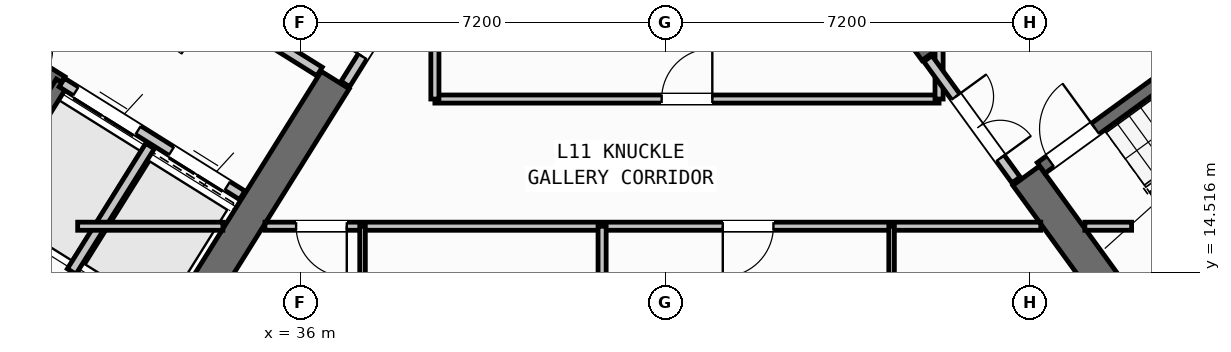
"""IFC4 building model, lengths in metres.
Left out: names, types, materials, properties, quantities, classifications, styles, units other than length and angle.
Written with IfcOpenShell. Run it as: python <this file> out.ifc"""

import sys

from ifc_helpers import new_model, si_unit, direction, frame, frame_2d, origin, place, context, subcontext, project, spatial, rectangle, extrude, source, transform, mapped, element, fill, save


model = new_model("IFC4")
c1 = context("Model", 3, precision=1e-05, world=origin(), true_north=direction((0.0, 1.0)))
c2 = subcontext(c1, "Body", "Model", "MODEL_VIEW")
j1 = project(units=[si_unit("LENGTHUNIT", "METRE"), si_unit("PLANEANGLEUNIT", "RADIAN")], contexts=[c1])
p1 = place(None, origin())
s1 = spatial("IfcSite", under=j1, at=p1, CompositionType="ELEMENT")
p2 = place(p1, origin())
s2 = spatial("IfcBuilding", under=s1, at=p2, CompositionType="ELEMENT")
p3 = place(p2, frame((0.0, 0.0, 45.6)))
s3 = spatial("IfcBuildingStorey", under=s2, at=p3, CompositionType="ELEMENT", Elevation=45.6)
p4 = place(p3, frame((33.409, 12.45, 0.0), z_axis=(0.0, 0.0, 1.0), x_axis=(-0.848051132073, 0.529914405721, 0.0)))
e1 = element("IfcWall", 1, at=p4, inside=s3, PredefinedType="SHEAR", context=c2, shape_type="SweptSolid", body=[
    extrude(rectangle(XDim=13.24, YDim=0.65, at=frame_2d((6.62, 0.0))), origin(), (0.0, 0.0, 1.0), 3.35),
])
p5 = place(p3, frame((36.683, 18.304, 0.0), z_axis=(0.0, 0.0, 1.0), x_axis=(-0.529899109053, -0.848060690178, 0.0)))
e2 = element("IfcWall", 2, at=p5, inside=s3, PredefinedType="SHEAR", context=c2, shape_type="SweptSolid", body=[
    extrude(rectangle(XDim=6.375, YDim=0.65, at=frame_2d((3.188, 0.0))), origin(), (0.0, 0.0, 1.0), 3.35),
])
p6 = place(p3, frame((52.318, 13.11, 0.0), z_axis=(0.0, 0.0, 1.0), x_axis=(0.809019445368, 0.587781878776, 0.0)))
e3 = element("IfcWall", 3, at=p6, inside=s3, PredefinedType="SHEAR", context=c2, shape_type="SweptSolid", body=[
    extrude(rectangle(XDim=12.44, YDim=0.65, at=frame_2d((6.22, 0.0))), origin(), (0.0, 0.0, 1.0), 3.35),
])
p7 = place(p3, frame((52.39, 13.564, 0.0), z_axis=(0.0, 0.0, 1.0), x_axis=(-0.58779688989, 0.809008539037, 0.0)))
e4 = element("IfcWall", 4, at=p7, inside=s3, PredefinedType="SHEAR", context=c2, shape_type="SweptSolid", body=[
    extrude(rectangle(XDim=3.525, YDim=0.65, at=frame_2d((1.763, 0.0))), origin(), (0.0, 0.0, 1.0), 3.35),
])
p8 = place(p3, frame((48.526, 18.884, 0.0), z_axis=(0.0, 0.0, 1.0), x_axis=(-0.58777996584, 0.809020835181, 0.0)))
e5 = element("IfcWall", 5, at=p8, inside=s3, PredefinedType="SHEAR", context=c2, shape_type="SweptSolid", body=[
    extrude(rectangle(XDim=6.375, YDim=0.65, at=frame_2d((3.188, 0.0))), origin(), (0.0, 0.0, 1.0), 3.35),
])
p9 = place(p3, frame((31.28, 18.261, 0.0), z_axis=(0.0, 0.0, 1.0), x_axis=(-0.848051618787, 0.529913626805, 0.0)))
e6 = element("IfcWall", 6, at=p9, inside=s3, PredefinedType="SHEAR", context=c2, shape_type="SweptSolid", body=[
    extrude(rectangle(XDim=7.46, YDim=0.26, at=frame_2d((3.73, 0.0))), origin(), (0.0, 0.0, 1.0), 3.35),
])
p10 = place(p9, frame((0.36, 0.0, 0.0)))
e7 = element("IfcOpeningElement", 7, at=p10, cuts=e6, PredefinedType="OPENING", context=c2, shape_type="SweptSolid", body=[
    extrude(rectangle(XDim=0.86, YDim=2.05, at=frame_2d((0.43, 1.025))), frame((0.0, 0.14, 0.0), z_axis=(0.0, -1.0, 0.0), x_axis=(1.0, 0.0, 0.0)), (0.0, 0.0, 1.0), 0.28),
])
p11 = place(p3, frame((31.288, 18.256, 0.0), z_axis=(0.0, 0.0, 1.0), x_axis=(-0.529943379326, -0.848033026897, 0.0)))
e8 = element("IfcWall", 8, at=p11, inside=s3, PredefinedType="SHEAR", context=c2, shape_type="SweptSolid", body=[
    extrude(rectangle(XDim=3.16, YDim=0.26, at=frame_2d((1.58, 0.0))), origin(), (0.0, 0.0, 1.0), 3.35),
])
p12 = place(p3, frame((34.848, 16.031, 0.0), z_axis=(0.0, 0.0, 1.0), x_axis=(-0.848044042236, 0.529925751807, 0.0)))
e9 = element("IfcWall", 9, at=p12, inside=s3, PredefinedType="STANDARD", context=c2, shape_type="SweptSolid", body=[
    extrude(rectangle(XDim=4.198, YDim=0.2, at=frame_2d((2.099, 0.0))), origin(), (0.0, 0.0, 1.0), 3.34),
])
p13 = place(p12, frame((0.348, 0.0, 0.0)))
e10 = element("IfcOpeningElement", 10, at=p13, cuts=e9, PredefinedType="OPENING", context=c2, shape_type="SweptSolid", body=[
    extrude(rectangle(XDim=1.3, YDim=2.2, at=frame_2d((0.65, 1.1))), frame((0.0, 0.11, 0.0), z_axis=(0.0, -1.0, 0.0), x_axis=(1.0, 0.0, 0.0)), (0.0, 0.0, 1.0), 0.22),
])
p14 = place(p12, frame((2.423, 0.0, 0.0)))
e11 = element("IfcOpeningElement", 11, at=p14, cuts=e9, PredefinedType="OPENING", context=c2, shape_type="SweptSolid", body=[
    extrude(rectangle(XDim=1.45, YDim=2.25, at=frame_2d((0.725, 1.125))), frame((0.0, 0.11, 0.0), z_axis=(0.0, -1.0, 0.0), x_axis=(1.0, 0.0, 0.0)), (0.0, 0.0, 1.0), 0.22),
])
p15 = place(p3, frame((36.374, 18.474, 0.0), z_axis=(0.0, 0.0, 1.0), x_axis=(-0.848051071577, 0.529914502535, 0.0)))
e12 = element("IfcWall", 12, at=p15, inside=s3, PredefinedType="STANDARD", context=c2, shape_type="SweptSolid", body=[
    extrude(rectangle(XDim=5.718, YDim=0.2, at=frame_2d((2.859, 0.0))), origin(), (0.0, 0.0, 1.0), 3.34),
])
p16 = place(p15, frame((2.498, 0.0, 0.0)))
e13 = element("IfcOpeningElement", 13, at=p16, cuts=e12, PredefinedType="OPENING", context=c2, shape_type="SweptSolid", body=[
    extrude(rectangle(XDim=1.15, YDim=2.1, at=frame_2d((0.575, 1.05))), frame((0.0, 0.11, 0.0), z_axis=(0.0, -1.0, 0.0), x_axis=(1.0, 0.0, 0.0)), (0.0, 0.0, 1.0), 0.22),
])
p17 = place(p3, frame((33.029, 17.003, 0.0), z_axis=(0.0, 0.0, 1.0), x_axis=(-0.529916267533, -0.848049968695, 0.0)))
e14 = element("IfcWall", 14, at=p17, inside=s3, PredefinedType="STANDARD", context=c2, shape_type="SweptSolid", body=[
    extrude(rectangle(XDim=2.92, YDim=0.2, at=frame_2d((1.46, 0.0))), origin(), (0.0, 0.0, 1.0), 3.34),
])
p18 = place(p3, frame((52.472, 14.013, 0.0), z_axis=(0.0, 0.0, 1.0), x_axis=(0.809028366311, 0.587769599847, 0.0)))
e15 = element("IfcWall", 15, at=p18, inside=s3, PredefinedType="SHEAR", context=c2, shape_type="SweptSolid", body=[
    extrude(rectangle(XDim=7.33, YDim=0.26, at=frame_2d((3.665, 0.0))), origin(), (0.0, 0.0, 1.0), 3.35),
])
p19 = place(p3, frame((50.615, 16.57, 0.0), z_axis=(0.0, 0.0, 1.0), x_axis=(0.809028366311, 0.587769599847, 0.0)))
e16 = element("IfcWall", 16, at=p19, inside=s3, PredefinedType="SHEAR", context=c2, shape_type="SweptSolid", body=[
    extrude(rectangle(XDim=7.33, YDim=0.26, at=frame_2d((3.665, 0.0))), origin(), (0.0, 0.0, 1.0), 3.35),
])
p20 = place(p19, frame((0.22, 0.0, 0.0)))
e17 = element("IfcOpeningElement", 17, at=p20, cuts=e16, PredefinedType="OPENING", context=c2, shape_type="SweptSolid", body=[
    extrude(rectangle(XDim=1.1, YDim=2.1, at=frame_2d((0.55, 1.05))), frame((0.0, 0.14, 0.0), z_axis=(0.0, -1.0, 0.0), x_axis=(1.0, 0.0, 0.0)), (0.0, 0.0, 1.0), 0.28),
])
p21 = place(p3, frame((32.164, 10.374, 0.0), z_axis=(0.0, 0.0, 1.0), x_axis=(-0.848044107957, 0.529925646633, 0.0)))
e18 = element("IfcWall", 18, at=p21, inside=s3, PredefinedType="PARTITIONING", context=c2, shape_type="SweptSolid", body=[
    extrude(rectangle(XDim=15.57, YDim=0.16, at=frame_2d((7.785, 0.0))), origin(), (0.0, 0.0, 1.0), 3.34),
])
p22 = place(p21, frame((10.83, 0.0, 0.0)))
e19 = element("IfcOpeningElement", 19, at=p22, cuts=e18, PredefinedType="OPENING", context=c2, shape_type="SweptSolid", body=[
    extrude(rectangle(XDim=1.0, YDim=2.1, at=frame_2d((0.5, 1.05))), frame((0.0, 0.09, 0.0), z_axis=(0.0, -1.0, 0.0), x_axis=(1.0, 0.0, 0.0)), (0.0, 0.0, 1.0), 0.18),
])
p23 = place(p3, frame((38.451, 20.737, 0.0), z_axis=(0.0, 0.0, 1.0), x_axis=(-0.529924799939, -0.848044637038, 0.0)))
e20 = element("IfcWall", 20, at=p23, inside=s3, PredefinedType="STANDARD", context=c2, shape_type="SweptSolid", body=[
    extrude(rectangle(XDim=2.96, YDim=0.2, at=frame_2d((1.48, 0.0))), origin(), (0.0, 0.0, 1.0), 3.34),
])
p24 = place(p23, frame((1.46, 0.0, 0.0)))
e21 = element("IfcOpeningElement", 21, at=p24, cuts=e20, PredefinedType="OPENING", context=c2, shape_type="SweptSolid", body=[
    extrude(rectangle(XDim=0.86, YDim=2.05, at=frame_2d((0.43, 1.025))), frame((0.0, 0.11, 0.0), z_axis=(0.0, -1.0, 0.0), x_axis=(1.0, 0.0, 0.0)), (0.0, 0.0, 1.0), 0.22),
])
p25 = place(p3, frame((31.6, 15.42, 0.0), z_axis=(0.0, 0.0, 1.0), x_axis=(1.0, 0.0, 0.0)))
e22 = element("IfcWall", 22, at=p25, inside=s3, PredefinedType="PARTITIONING", context=c2, shape_type="SweptSolid", body=[
    extrude(rectangle(XDim=2.866, YDim=0.16, at=frame_2d((1.433, 0.0))), origin(), (0.0, 0.0, 1.0), 3.34),
])
p26 = place(p3, frame((35.296, 15.42, 0.0), z_axis=(0.0, 0.0, 1.0), x_axis=(1.0, 0.0, 0.0)))
e23 = element("IfcWall", 23, at=p26, inside=s3, PredefinedType="PARTITIONING", context=c2, shape_type="SweptSolid", body=[
    extrude(rectangle(XDim=15.311, YDim=0.16, at=frame_2d((7.655, 0.0))), origin(), (0.0, 0.0, 1.0), 3.34),
])
p27 = place(p26, frame((0.615, 0.0, 0.0)))
e24 = element("IfcOpeningElement", 24, at=p27, cuts=e23, PredefinedType="OPENING", context=c2, shape_type="SweptSolid", body=[
    extrude(rectangle(XDim=1.0, YDim=2.1, at=frame_2d((0.5, 1.05))), frame((0.0, 0.09, 0.0), z_axis=(0.0, -1.0, 0.0), x_axis=(1.0, 0.0, 0.0)), (0.0, 0.0, 1.0), 0.18),
])
p28 = place(p26, frame((9.035, 0.0, 0.0)))
e25 = element("IfcOpeningElement", 25, at=p28, cuts=e23, PredefinedType="OPENING", context=c2, shape_type="SweptSolid", body=[
    extrude(rectangle(XDim=1.0, YDim=2.1, at=frame_2d((0.5, 1.05))), frame((0.0, 0.09, 0.0), z_axis=(0.0, -1.0, 0.0), x_axis=(1.0, 0.0, 0.0)), (0.0, 0.0, 1.0), 0.18),
])
p29 = place(p3, frame((51.477, 15.42, 0.0), z_axis=(0.0, 0.0, 1.0), x_axis=(1.0, 0.0, 0.0)))
e26 = element("IfcWall", 26, at=p29, inside=s3, PredefinedType="PARTITIONING", context=c2, shape_type="SweptSolid", body=[
    extrude(rectangle(XDim=0.923, YDim=0.16, at=frame_2d((0.461, 0.0))), origin(), (0.0, 0.0, 1.0), 3.34),
])
p30 = place(p3, frame((38.65, 17.93, 0.0), z_axis=(0.0, 0.0, 1.0), x_axis=(1.0, 0.0, 0.0)))
e27 = element("IfcWall", 27, at=p30, inside=s3, PredefinedType="PARTITIONING", context=c2, shape_type="SweptSolid", body=[
    extrude(rectangle(XDim=9.95, YDim=0.16, at=frame_2d((4.975, 0.0))), origin(), (0.0, 0.0, 1.0), 3.34),
])
p31 = place(p30, frame((4.475, 0.0, 0.0)))
e28 = element("IfcOpeningElement", 28, at=p31, cuts=e27, PredefinedType="OPENING", context=c2, shape_type="SweptSolid", body=[
    extrude(rectangle(XDim=1.0, YDim=2.1, at=frame_2d((0.5, 1.05))), frame((0.0, 0.09, 0.0), z_axis=(0.0, -1.0, 0.0), x_axis=(1.0, 0.0, 0.0)), (0.0, 0.0, 1.0), 0.18),
])
p32 = place(p3, frame((38.65, 17.93, 0.0), z_axis=(0.0, 0.0, 1.0), x_axis=(0.0, 1.0, 0.0)))
e29 = element("IfcWall", 29, at=p32, inside=s3, PredefinedType="PARTITIONING", context=c2, shape_type="SweptSolid", body=[
    extrude(rectangle(XDim=2.857, YDim=0.16, at=frame_2d((1.428, 0.0))), origin(), (0.0, 0.0, 1.0), 3.34),
])
p33 = place(p3, frame((48.6, 17.93, 0.0), z_axis=(0.0, 0.0, 1.0), x_axis=(0.0, 1.0, 0.0)))
e30 = element("IfcWall", 30, at=p33, inside=s3, PredefinedType="PARTITIONING", context=c2, shape_type="SweptSolid", body=[
    extrude(rectangle(XDim=0.993, YDim=0.16, at=frame_2d((0.496, 0.0))), origin(), (0.0, 0.0, 1.0), 3.34),
])
p34 = place(p3, frame((50.119, 16.333, 0.0), z_axis=(0.0, 0.0, 1.0), x_axis=(-0.587749856981, 0.809042709391, 0.0)))
e31 = element("IfcWall", 31, at=p34, inside=s3, PredefinedType="STANDARD", context=c2, shape_type="SweptSolid", body=[
    extrude(rectangle(XDim=2.96, YDim=0.2, at=frame_2d((1.48, 0.0))), origin(), (0.0, 0.0, 1.0), 3.34),
])
p35 = place(p34, frame((0.53, 0.0, 0.0)))
e32 = element("IfcOpeningElement", 32, at=p35, cuts=e31, PredefinedType="OPENING", context=c2, shape_type="SweptSolid", body=[
    extrude(rectangle(XDim=1.5, YDim=2.15, at=frame_2d((0.75, 1.075))), frame((0.0, 0.11, 0.0), z_axis=(0.0, -1.0, 0.0), x_axis=(1.0, 0.0, 0.0)), (0.0, 0.0, 1.0), 0.22),
])
p36 = place(p3, frame((41.95, 1.96, 0.0), z_axis=(0.0, 0.0, 1.0), x_axis=(0.0, 1.0, 0.0)))
e33 = element("IfcWall", 33, at=p36, inside=s3, PredefinedType="PARTITIONING", context=c2, shape_type="SweptSolid", body=[
    extrude(rectangle(XDim=13.46, YDim=0.16, at=frame_2d((6.73, 0.0))), origin(), (0.0, 0.0, 1.0), 3.34),
])
p37 = place(p3, frame((37.222, 1.96, 0.0), z_axis=(0.0, 0.0, 1.0), x_axis=(0.0, 1.0, 0.0)))
e34 = element("IfcWall", 34, at=p37, inside=s3, PredefinedType="PARTITIONING", context=c2, shape_type="SweptSolid", body=[
    extrude(rectangle(XDim=13.46, YDim=0.11, at=frame_2d((6.73, 0.0))), origin(), (0.0, 0.0, 1.0), 3.34),
])
p38 = place(p37, frame((5.2, 0.0, 0.0)))
e35 = element("IfcOpeningElement", 35, at=p38, cuts=e34, PredefinedType="OPENING", context=c2, shape_type="SweptSolid", body=[
    extrude(rectangle(XDim=0.92, YDim=2.08, at=frame_2d((0.46, 1.04))), frame((0.0, 0.065, 0.0), z_axis=(0.0, -1.0, 0.0), x_axis=(1.0, 0.0, 0.0)), (0.0, 0.0, 1.0), 0.13),
])
p39 = place(p37, frame((10.89, 0.0, 0.0)))
e36 = element("IfcOpeningElement", 36, at=p39, cuts=e34, PredefinedType="OPENING", context=c2, shape_type="SweptSolid", body=[
    extrude(rectangle(XDim=0.88, YDim=2.08, at=frame_2d((0.44, 1.04))), frame((0.0, 0.065, 0.0), z_axis=(0.0, -1.0, 0.0), x_axis=(1.0, 0.0, 0.0)), (0.0, 0.0, 1.0), 0.13),
])
p40 = place(p3, frame((47.663, 1.96, 0.0), z_axis=(0.0, 0.0, 1.0), x_axis=(0.0, 1.0, 0.0)))
e37 = element("IfcWall", 37, at=p40, inside=s3, PredefinedType="PARTITIONING", context=c2, shape_type="SweptSolid", body=[
    extrude(rectangle(XDim=13.46, YDim=0.11, at=frame_2d((6.73, 0.0))), origin(), (0.0, 0.0, 1.0), 3.34),
])
p41 = place(p40, frame((6.3, 0.0, 0.0)))
e38 = element("IfcOpeningElement", 38, at=p41, cuts=e37, PredefinedType="OPENING", context=c2, shape_type="SweptSolid", body=[
    extrude(rectangle(XDim=0.92, YDim=2.08, at=frame_2d((0.46, 1.04))), frame((0.0, 0.065, 0.0), z_axis=(0.0, -1.0, 0.0), x_axis=(1.0, 0.0, 0.0)), (0.0, 0.0, 1.0), 0.13),
])
p42 = place(p40, frame((11.54, 0.0, 0.0)))
e39 = element("IfcOpeningElement", 39, at=p42, cuts=e37, PredefinedType="OPENING", context=c2, shape_type="SweptSolid", body=[
    extrude(rectangle(XDim=0.88, YDim=2.08, at=frame_2d((0.44, 1.04))), frame((0.0, 0.065, 0.0), z_axis=(0.0, -1.0, 0.0), x_axis=(1.0, 0.0, 0.0)), (0.0, 0.0, 1.0), 0.13),
])
m1 = source(origin(), c2, "Body", "SweptSolid", [
    extrude(rectangle(XDim=1.3, YDim=2.2, at=frame_2d((0.65, 1.1))), frame((0.0, 0.025, 0.0), z_axis=(0.0, -1.0, 0.0), x_axis=(1.0, 0.0, 0.0)), (0.0, 0.0, 1.0), 0.05),
])
p43 = place(p13, origin())
e40 = element("IfcDoor", 40, at=p43, inside=s3, OperationType="DOUBLE_DOOR_SLIDING", PredefinedType="DOOR", context=c2, shape_type="MappedRepresentation", body=[
    mapped(m1, transform((0.0, 0.0, 0.0), scale=1.0)),
])
fill(e10, e40)
m2 = source(origin(), c2, "Body", "SweptSolid", [
    extrude(rectangle(XDim=1.45, YDim=2.25, at=frame_2d((0.725, 1.125))), frame((0.0, 0.025, 0.0), z_axis=(0.0, -1.0, 0.0), x_axis=(1.0, 0.0, 0.0)), (0.0, 0.0, 1.0), 0.05),
])
p44 = place(p14, origin())
e41 = element("IfcDoor", 41, at=p44, inside=s3, OperationType="DOUBLE_DOOR_SLIDING", PredefinedType="DOOR", context=c2, shape_type="MappedRepresentation", body=[
    mapped(m2, transform((0.0, 0.0, 0.0), scale=1.0)),
])
fill(e11, e41)
m3 = source(origin(), c2, "Body", "SweptSolid", [
    extrude(rectangle(XDim=1.1, YDim=2.1, at=frame_2d((0.55, 1.05))), frame((0.0, 0.025, 0.0), z_axis=(0.0, -1.0, 0.0), x_axis=(1.0, 0.0, 0.0)), (0.0, 0.0, 1.0), 0.05),
])
p45 = place(p20, origin())
e42 = element("IfcDoor", 42, at=p45, inside=s3, OperationType="SINGLE_SWING_RIGHT", PredefinedType="DOOR", context=c2, shape_type="MappedRepresentation", body=[
    mapped(m3, transform((0.0, 0.0, 0.0), scale=1.0)),
])
fill(e17, e42)
m4 = source(origin(), c2, "Body", "SweptSolid", [
    extrude(rectangle(XDim=1.0, YDim=2.1, at=frame_2d((0.5, 1.05))), frame((0.0, 0.025, 0.0), z_axis=(0.0, -1.0, 0.0), x_axis=(1.0, 0.0, 0.0)), (0.0, 0.0, 1.0), 0.05),
])
p46 = place(p31, origin())
e43 = element("IfcDoor", 43, at=p46, inside=s3, OperationType="SINGLE_SWING_RIGHT", PredefinedType="DOOR", context=c2, shape_type="MappedRepresentation", body=[
    mapped(m4, transform((0.0, 0.0, 0.0), scale=1.0)),
])
fill(e28, e43)
m5 = source(origin(), c2, "Body", "SweptSolid", [
    extrude(rectangle(XDim=0.86, YDim=2.05, at=frame_2d((0.43, 1.025))), frame((0.0, 0.025, 0.0), z_axis=(0.0, -1.0, 0.0), x_axis=(1.0, 0.0, 0.0)), (0.0, 0.0, 1.0), 0.05),
])
p47 = place(p24, frame((0.86, 0.0, 0.0), z_axis=(0.0, 0.0, 1.0), x_axis=(-1.0, 0.0, 0.0)))
e44 = element("IfcDoor", 44, at=p47, inside=s3, OperationType="SINGLE_SWING_LEFT", PredefinedType="DOOR", context=c2, shape_type="MappedRepresentation", body=[
    mapped(m5, transform((0.0, 0.0, 0.0), scale=1.0)),
])
fill(e21, e44)
m6 = source(origin(), c2, "Body", "SweptSolid", [
    extrude(rectangle(XDim=1.5, YDim=2.15, at=frame_2d((0.75, 1.075))), frame((0.0, 0.025, 0.0), z_axis=(0.0, -1.0, 0.0), x_axis=(1.0, 0.0, 0.0)), (0.0, 0.0, 1.0), 0.05),
])
p48 = place(p35, frame((1.5, 0.0, 0.0), z_axis=(0.0, 0.0, 1.0), x_axis=(-1.0, 0.0, 0.0)))
e45 = element("IfcDoor", 45, at=p48, inside=s3, OperationType="DOUBLE_DOOR_SINGLE_SWING", PredefinedType="DOOR", context=c2, shape_type="MappedRepresentation", body=[
    mapped(m6, transform((0.0, 0.0, 0.0), scale=1.0)),
])
fill(e32, e45)
p49 = place(p27, frame((1.0, 0.0, 0.0), z_axis=(0.0, 0.0, 1.0), x_axis=(-1.0, 0.0, 0.0)))
e46 = element("IfcDoor", 46, at=p49, inside=s3, OperationType="SINGLE_SWING_LEFT", PredefinedType="DOOR", context=c2, shape_type="MappedRepresentation", body=[
    mapped(m4, transform((0.0, 0.0, 0.0), scale=1.0)),
])
fill(e24, e46)
p50 = place(p28, frame((1.0, 0.0, 0.0), z_axis=(0.0, 0.0, 1.0), x_axis=(-1.0, 0.0, 0.0)))
e47 = element("IfcDoor", 47, at=p50, inside=s3, OperationType="SINGLE_SWING_RIGHT", PredefinedType="DOOR", context=c2, shape_type="MappedRepresentation", body=[
    mapped(m4, transform((0.0, 0.0, 0.0), scale=1.0)),
])
fill(e25, e47)
save(model, sys.argv[1])
